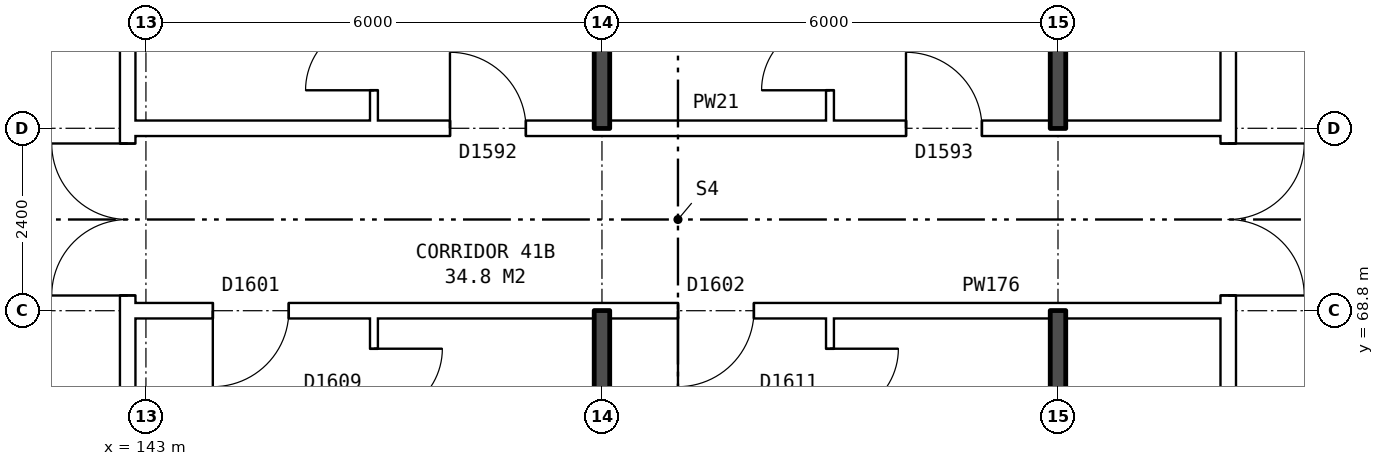
"""IFC4 building model, lengths in metres.
Left out: names, types, materials, properties, quantities, classifications, styles, units other than length and angle.
Written with IfcOpenShell. Run it as: python <this file> out.ifc"""

import sys

from ifc_helpers import new_model, si_unit, direction, frame, frame_2d, origin, place, context, subcontext, project, spatial, rectangle, extrude, element, fill, save


model = new_model("IFC4")
c1 = context("Model", 3, precision=1e-05, world=origin(), true_north=direction((0.0, 1.0)))
c2 = subcontext(c1, "Body", "Model", "MODEL_VIEW")
j1 = project(units=[si_unit("LENGTHUNIT", "METRE"), si_unit("PLANEANGLEUNIT", "RADIAN")], contexts=[c1])
p1 = place(None, origin())
s1 = spatial("IfcSite", under=j1, at=p1, CompositionType="ELEMENT")
p2 = place(p1, origin())
s2 = spatial("IfcBuilding", under=s1, at=p2, CompositionType="ELEMENT")
p3 = place(p2, frame((0.0, 0.0, 148.5)))
s3 = spatial("IfcBuildingStorey", under=s2, at=p3, CompositionType="ELEMENT", Elevation=148.5)
p4 = place(p3, frame((142.76, 63.9, 0.0), z_axis=(0.0, 0.0, 1.0), x_axis=(0.0, 1.0, 0.0)))
e1 = element("IfcWall", 1, at=p4, inside=s3, PredefinedType="PARTITIONING", context=c2, shape_type="SweptSolid", body=[
    extrude(rectangle(XDim=12.2, YDim=0.2, at=frame_2d((6.1, 0.0))), origin(), (0.0, 0.0, 1.0), 2.85),
])
p5 = place(p4, frame((5.1, 0.0, 0.0)))
e2 = element("IfcOpeningElement", 2, at=p5, cuts=e1, PredefinedType="OPENING", context=c2, shape_type="SweptSolid", body=[
    extrude(rectangle(XDim=2.0, YDim=2.1, at=frame_2d((1.0, 1.05))), frame((0.0, 0.11, 0.0), z_axis=(0.0, -1.0, 0.0), x_axis=(1.0, 0.0, 0.0)), (0.0, 0.0, 1.0), 0.22),
])
p6 = place(p3, frame((157.24, 63.9, 0.0), z_axis=(0.0, 0.0, 1.0), x_axis=(0.0, 1.0, 0.0)))
e3 = element("IfcWall", 3, at=p6, inside=s3, PredefinedType="PARTITIONING", context=c2, shape_type="SweptSolid", body=[
    extrude(rectangle(XDim=12.2, YDim=0.2, at=frame_2d((6.1, 0.0))), origin(), (0.0, 0.0, 1.0), 2.85),
])
p7 = place(p6, frame((5.1, 0.0, 0.0)))
e4 = element("IfcOpeningElement", 4, at=p7, cuts=e3, PredefinedType="OPENING", context=c2, shape_type="SweptSolid", body=[
    extrude(rectangle(XDim=2.0, YDim=2.1, at=frame_2d((1.0, 1.05))), frame((0.0, 0.11, 0.0), z_axis=(0.0, -1.0, 0.0), x_axis=(1.0, 0.0, 0.0)), (0.0, 0.0, 1.0), 0.22),
])
p8 = place(p3, frame((142.76, 68.8, 0.0), z_axis=(0.0, 0.0, 1.0), x_axis=(1.0, 0.0, 0.0)))
e5 = element("IfcWall", 5, at=p8, inside=s3, PredefinedType="PARTITIONING", context=c2, shape_type="SweptSolid", body=[
    extrude(rectangle(XDim=14.48, YDim=0.2, at=frame_2d((7.24, 0.0))), origin(), (0.0, 0.0, 1.0), 2.85),
])
p9 = place(p8, frame((1.12, 0.0, 0.0)))
e6 = element("IfcOpeningElement", 6, at=p9, cuts=e5, PredefinedType="OPENING", context=c2, shape_type="SweptSolid", body=[
    extrude(rectangle(XDim=1.0, YDim=2.1, at=frame_2d((0.5, 1.05))), frame((0.0, 0.11, 0.0), z_axis=(0.0, -1.0, 0.0), x_axis=(1.0, 0.0, 0.0)), (0.0, 0.0, 1.0), 0.22),
])
p10 = place(p8, frame((7.24, 0.0, 0.0)))
e7 = element("IfcOpeningElement", 7, at=p10, cuts=e5, PredefinedType="OPENING", context=c2, shape_type="SweptSolid", body=[
    extrude(rectangle(XDim=1.0, YDim=2.1, at=frame_2d((0.5, 1.05))), frame((0.0, 0.11, 0.0), z_axis=(0.0, -1.0, 0.0), x_axis=(1.0, 0.0, 0.0)), (0.0, 0.0, 1.0), 0.22),
])
p11 = place(p3, frame((142.76, 71.2, 0.0), z_axis=(0.0, 0.0, 1.0), x_axis=(1.0, 0.0, 0.0)))
e8 = element("IfcWall", 8, at=p11, inside=s3, PredefinedType="PARTITIONING", context=c2, shape_type="SweptSolid", body=[
    extrude(rectangle(XDim=14.48, YDim=0.2, at=frame_2d((7.24, 0.0))), origin(), (0.0, 0.0, 1.0), 2.85),
])
p12 = place(p11, frame((4.24, 0.0, 0.0)))
e9 = element("IfcOpeningElement", 9, at=p12, cuts=e8, PredefinedType="OPENING", context=c2, shape_type="SweptSolid", body=[
    extrude(rectangle(XDim=1.0, YDim=2.1, at=frame_2d((0.5, 1.05))), frame((0.0, 0.11, 0.0), z_axis=(0.0, -1.0, 0.0), x_axis=(1.0, 0.0, 0.0)), (0.0, 0.0, 1.0), 0.22),
])
p13 = place(p11, frame((10.24, 0.0, 0.0)))
e10 = element("IfcOpeningElement", 10, at=p13, cuts=e8, PredefinedType="OPENING", context=c2, shape_type="SweptSolid", body=[
    extrude(rectangle(XDim=1.0, YDim=2.1, at=frame_2d((0.5, 1.05))), frame((0.0, 0.11, 0.0), z_axis=(0.0, -1.0, 0.0), x_axis=(1.0, 0.0, 0.0)), (0.0, 0.0, 1.0), 0.22),
])
p14 = place(p3, frame((146.0, 54.36, 0.0), z_axis=(0.0, 0.0, 1.0), x_axis=(0.0, 1.0, 0.0)))
e11 = element("IfcWall", 11, at=p14, inside=s3, PredefinedType="PARTITIONING", context=c2, shape_type="SweptSolid", body=[
    extrude(rectangle(XDim=14.34, YDim=0.1, at=frame_2d((7.17, 0.0))), origin(), (0.0, 0.0, 1.0), 2.85),
])
p15 = place(p14, frame((6.7, 0.0, 0.0)))
e12 = element("IfcOpeningElement", 12, at=p15, cuts=e11, PredefinedType="OPENING", context=c2, shape_type="SweptSolid", body=[
    extrude(rectangle(XDim=0.9, YDim=2.1, at=frame_2d((0.45, 1.05))), frame((0.0, 0.06, 0.0), z_axis=(0.0, -1.0, 0.0), x_axis=(1.0, 0.0, 0.0)), (0.0, 0.0, 1.0), 0.12),
])
p16 = place(p14, frame((13.04, 0.0, 0.0)))
e13 = element("IfcOpeningElement", 13, at=p16, cuts=e11, PredefinedType="OPENING", context=c2, shape_type="SweptSolid", body=[
    extrude(rectangle(XDim=0.9, YDim=2.1, at=frame_2d((0.45, 1.05))), frame((0.0, 0.06, 0.0), z_axis=(0.0, -1.0, 0.0), x_axis=(1.0, 0.0, 0.0)), (0.0, 0.0, 1.0), 0.12),
])
p17 = place(p3, frame((146.0, 71.3, 0.0), z_axis=(0.0, 0.0, 1.0), x_axis=(0.0, 1.0, 0.0)))
e14 = element("IfcWall", 14, at=p17, inside=s3, PredefinedType="PARTITIONING", context=c2, shape_type="SweptSolid", body=[
    extrude(rectangle(XDim=14.34, YDim=0.1, at=frame_2d((7.17, 0.0))), origin(), (0.0, 0.0, 1.0), 2.85),
])
p18 = place(p17, frame((6.74, 0.0, 0.0)))
e15 = element("IfcOpeningElement", 15, at=p18, cuts=e14, PredefinedType="OPENING", context=c2, shape_type="SweptSolid", body=[
    extrude(rectangle(XDim=0.9, YDim=2.1, at=frame_2d((0.45, 1.05))), frame((0.0, 0.06, 0.0), z_axis=(0.0, -1.0, 0.0), x_axis=(1.0, 0.0, 0.0)), (0.0, 0.0, 1.0), 0.12),
])
p19 = place(p17, frame((0.4, 0.0, 0.0)))
e16 = element("IfcOpeningElement", 16, at=p19, cuts=e14, PredefinedType="OPENING", context=c2, shape_type="SweptSolid", body=[
    extrude(rectangle(XDim=0.9, YDim=2.1, at=frame_2d((0.45, 1.05))), frame((0.0, 0.06, 0.0), z_axis=(0.0, -1.0, 0.0), x_axis=(1.0, 0.0, 0.0)), (0.0, 0.0, 1.0), 0.12),
])
for number, where, z_axis, x_axis in (
    (17, (149.0, 54.36, 0.0), (0.0, 0.0, 1.0), (0.0, 1.0, 0.0)),
    (18, (149.0, 71.2, 0.0), (0.0, 0.0, 1.0), (0.0, 1.0, 0.0)),
):
    element("IfcWall", number, at=place(p3, frame(where, z_axis=z_axis, x_axis=x_axis)), inside=s3, PredefinedType="SOLIDWALL", context=c2, shape_type="SweptSolid", body=[
        extrude(rectangle(XDim=14.44, YDim=0.2, at=frame_2d((7.22, 0.0))), origin(), (0.0, 0.0, 1.0), 2.85),
    ])
p20 = place(p3, frame((152.0, 54.36, 0.0), z_axis=(0.0, 0.0, 1.0), x_axis=(0.0, 1.0, 0.0)))
e19 = element("IfcWall", 19, at=p20, inside=s3, PredefinedType="PARTITIONING", context=c2, shape_type="SweptSolid", body=[
    extrude(rectangle(XDim=14.34, YDim=0.1, at=frame_2d((7.17, 0.0))), origin(), (0.0, 0.0, 1.0), 2.85),
])
p21 = place(p20, frame((5.5, 0.0, 0.0)))
e20 = element("IfcOpeningElement", 20, at=p21, cuts=e19, PredefinedType="OPENING", context=c2, shape_type="SweptSolid", body=[
    extrude(rectangle(XDim=0.9, YDim=2.1, at=frame_2d((0.45, 1.05))), frame((0.0, 0.06, 0.0), z_axis=(0.0, -1.0, 0.0), x_axis=(1.0, 0.0, 0.0)), (0.0, 0.0, 1.0), 0.12),
])
p22 = place(p20, frame((13.04, 0.0, 0.0)))
e21 = element("IfcOpeningElement", 21, at=p22, cuts=e19, PredefinedType="OPENING", context=c2, shape_type="SweptSolid", body=[
    extrude(rectangle(XDim=0.9, YDim=2.1, at=frame_2d((0.45, 1.05))), frame((0.0, 0.06, 0.0), z_axis=(0.0, -1.0, 0.0), x_axis=(1.0, 0.0, 0.0)), (0.0, 0.0, 1.0), 0.12),
])
p23 = place(p3, frame((152.0, 71.3, 0.0), z_axis=(0.0, 0.0, 1.0), x_axis=(0.0, 1.0, 0.0)))
e22 = element("IfcWall", 22, at=p23, inside=s3, PredefinedType="PARTITIONING", context=c2, shape_type="SweptSolid", body=[
    extrude(rectangle(XDim=14.34, YDim=0.1, at=frame_2d((7.17, 0.0))), origin(), (0.0, 0.0, 1.0), 2.85),
])
p24 = place(p23, frame((9.24, 0.0, 0.0)))
e23 = element("IfcOpeningElement", 23, at=p24, cuts=e22, PredefinedType="OPENING", context=c2, shape_type="SweptSolid", body=[
    extrude(rectangle(XDim=0.9, YDim=2.1, at=frame_2d((0.45, 1.05))), frame((0.0, 0.06, 0.0), z_axis=(0.0, -1.0, 0.0), x_axis=(1.0, 0.0, 0.0)), (0.0, 0.0, 1.0), 0.12),
])
p25 = place(p23, frame((0.4, 0.0, 0.0)))
e24 = element("IfcOpeningElement", 24, at=p25, cuts=e22, PredefinedType="OPENING", context=c2, shape_type="SweptSolid", body=[
    extrude(rectangle(XDim=0.9, YDim=2.1, at=frame_2d((0.45, 1.05))), frame((0.0, 0.06, 0.0), z_axis=(0.0, -1.0, 0.0), x_axis=(1.0, 0.0, 0.0)), (0.0, 0.0, 1.0), 0.12),
])
for number, where, z_axis, x_axis in (
    (25, (155.0, 63.8, 0.0), (0.0, 0.0, 1.0), (0.0, 1.0, 0.0)),
    (26, (155.0, 71.2, 0.0), (0.0, 0.0, 1.0), (0.0, 1.0, 0.0)),
):
    element("IfcWall", number, at=place(p3, frame(where, z_axis=z_axis, x_axis=x_axis)), inside=s3, PredefinedType="SOLIDWALL", context=c2, shape_type="SweptSolid", body=[
        extrude(rectangle(XDim=5.0, YDim=0.2, at=frame_2d((2.5, 0.0))), origin(), (0.0, 0.0, 1.0), 2.85),
    ])
p26 = place(p5, origin())
e27 = element("IfcDoor", 27, at=p26, inside=s3, OperationType="DOUBLE_DOOR_SINGLE_SWING", PredefinedType="DOOR", context=c2, shape_type="SweptSolid", body=[
    extrude(rectangle(XDim=2.0, YDim=2.1, at=frame_2d((1.0, 1.05))), frame((0.0, 0.025, 0.0), z_axis=(0.0, -1.0, 0.0), x_axis=(1.0, 0.0, 0.0)), (0.0, 0.0, 1.0), 0.05),
])
fill(e2, e27)
p27 = place(p7, frame((2.0, 0.0, 0.0), z_axis=(0.0, 0.0, 1.0), x_axis=(-1.0, 0.0, 0.0)))
e28 = element("IfcDoor", 28, at=p27, inside=s3, OperationType="DOUBLE_DOOR_SINGLE_SWING", PredefinedType="DOOR", context=c2, shape_type="SweptSolid", body=[
    extrude(rectangle(XDim=2.0, YDim=2.1, at=frame_2d((1.0, 1.05))), frame((0.0, 0.025, 0.0), z_axis=(0.0, -1.0, 0.0), x_axis=(1.0, 0.0, 0.0)), (0.0, 0.0, 1.0), 0.05),
])
fill(e4, e28)
p28 = place(p9, frame((1.0, 0.0, 0.0), z_axis=(0.0, 0.0, 1.0), x_axis=(-1.0, 0.0, 0.0)))
e29 = element("IfcDoor", 29, at=p28, inside=s3, OperationType="SINGLE_SWING_RIGHT", PredefinedType="DOOR", context=c2, shape_type="SweptSolid", body=[
    extrude(rectangle(XDim=1.0, YDim=2.1, at=frame_2d((0.5, 1.05))), frame((0.0, 0.025, 0.0), z_axis=(0.0, -1.0, 0.0), x_axis=(1.0, 0.0, 0.0)), (0.0, 0.0, 1.0), 0.05),
])
fill(e6, e29)
p29 = place(p16, frame((0.9, 0.0, 0.0), z_axis=(0.0, 0.0, 1.0), x_axis=(-1.0, 0.0, 0.0)))
e30 = element("IfcDoor", 30, at=p29, inside=s3, OperationType="SINGLE_SWING_LEFT", PredefinedType="DOOR", context=c2, shape_type="SweptSolid", body=[
    extrude(rectangle(XDim=0.9, YDim=2.1, at=frame_2d((0.45, 1.05))), frame((0.0, 0.025, 0.0), z_axis=(0.0, -1.0, 0.0), x_axis=(1.0, 0.0, 0.0)), (0.0, 0.0, 1.0), 0.05),
])
fill(e13, e30)
p30 = place(p10, frame((1.0, 0.0, 0.0), z_axis=(0.0, 0.0, 1.0), x_axis=(-1.0, 0.0, 0.0)))
e31 = element("IfcDoor", 31, at=p30, inside=s3, OperationType="SINGLE_SWING_RIGHT", PredefinedType="DOOR", context=c2, shape_type="SweptSolid", body=[
    extrude(rectangle(XDim=1.0, YDim=2.1, at=frame_2d((0.5, 1.05))), frame((0.0, 0.025, 0.0), z_axis=(0.0, -1.0, 0.0), x_axis=(1.0, 0.0, 0.0)), (0.0, 0.0, 1.0), 0.05),
])
fill(e7, e31)
p31 = place(p22, frame((0.9, 0.0, 0.0), z_axis=(0.0, 0.0, 1.0), x_axis=(-1.0, 0.0, 0.0)))
e32 = element("IfcDoor", 32, at=p31, inside=s3, OperationType="SINGLE_SWING_LEFT", PredefinedType="DOOR", context=c2, shape_type="SweptSolid", body=[
    extrude(rectangle(XDim=0.9, YDim=2.1, at=frame_2d((0.45, 1.05))), frame((0.0, 0.025, 0.0), z_axis=(0.0, -1.0, 0.0), x_axis=(1.0, 0.0, 0.0)), (0.0, 0.0, 1.0), 0.05),
])
fill(e21, e32)
p32 = place(p12, origin())
e33 = element("IfcDoor", 33, at=p32, inside=s3, OperationType="SINGLE_SWING_LEFT", PredefinedType="DOOR", context=c2, shape_type="SweptSolid", body=[
    extrude(rectangle(XDim=1.0, YDim=2.1, at=frame_2d((0.5, 1.05))), frame((0.0, 0.025, 0.0), z_axis=(0.0, -1.0, 0.0), x_axis=(1.0, 0.0, 0.0)), (0.0, 0.0, 1.0), 0.05),
])
fill(e9, e33)
p33 = place(p19, origin())
e34 = element("IfcDoor", 34, at=p33, inside=s3, OperationType="SINGLE_SWING_LEFT", PredefinedType="DOOR", context=c2, shape_type="SweptSolid", body=[
    extrude(rectangle(XDim=0.9, YDim=2.1, at=frame_2d((0.45, 1.05))), frame((0.0, 0.025, 0.0), z_axis=(0.0, -1.0, 0.0), x_axis=(1.0, 0.0, 0.0)), (0.0, 0.0, 1.0), 0.05),
])
fill(e16, e34)
p34 = place(p13, origin())
e35 = element("IfcDoor", 35, at=p34, inside=s3, OperationType="SINGLE_SWING_LEFT", PredefinedType="DOOR", context=c2, shape_type="SweptSolid", body=[
    extrude(rectangle(XDim=1.0, YDim=2.1, at=frame_2d((0.5, 1.05))), frame((0.0, 0.025, 0.0), z_axis=(0.0, -1.0, 0.0), x_axis=(1.0, 0.0, 0.0)), (0.0, 0.0, 1.0), 0.05),
])
fill(e10, e35)
p35 = place(p25, origin())
e36 = element("IfcDoor", 36, at=p35, inside=s3, OperationType="SINGLE_SWING_LEFT", PredefinedType="DOOR", context=c2, shape_type="SweptSolid", body=[
    extrude(rectangle(XDim=0.9, YDim=2.1, at=frame_2d((0.45, 1.05))), frame((0.0, 0.025, 0.0), z_axis=(0.0, -1.0, 0.0), x_axis=(1.0, 0.0, 0.0)), (0.0, 0.0, 1.0), 0.05),
])
fill(e24, e36)
save(model, sys.argv[1])
